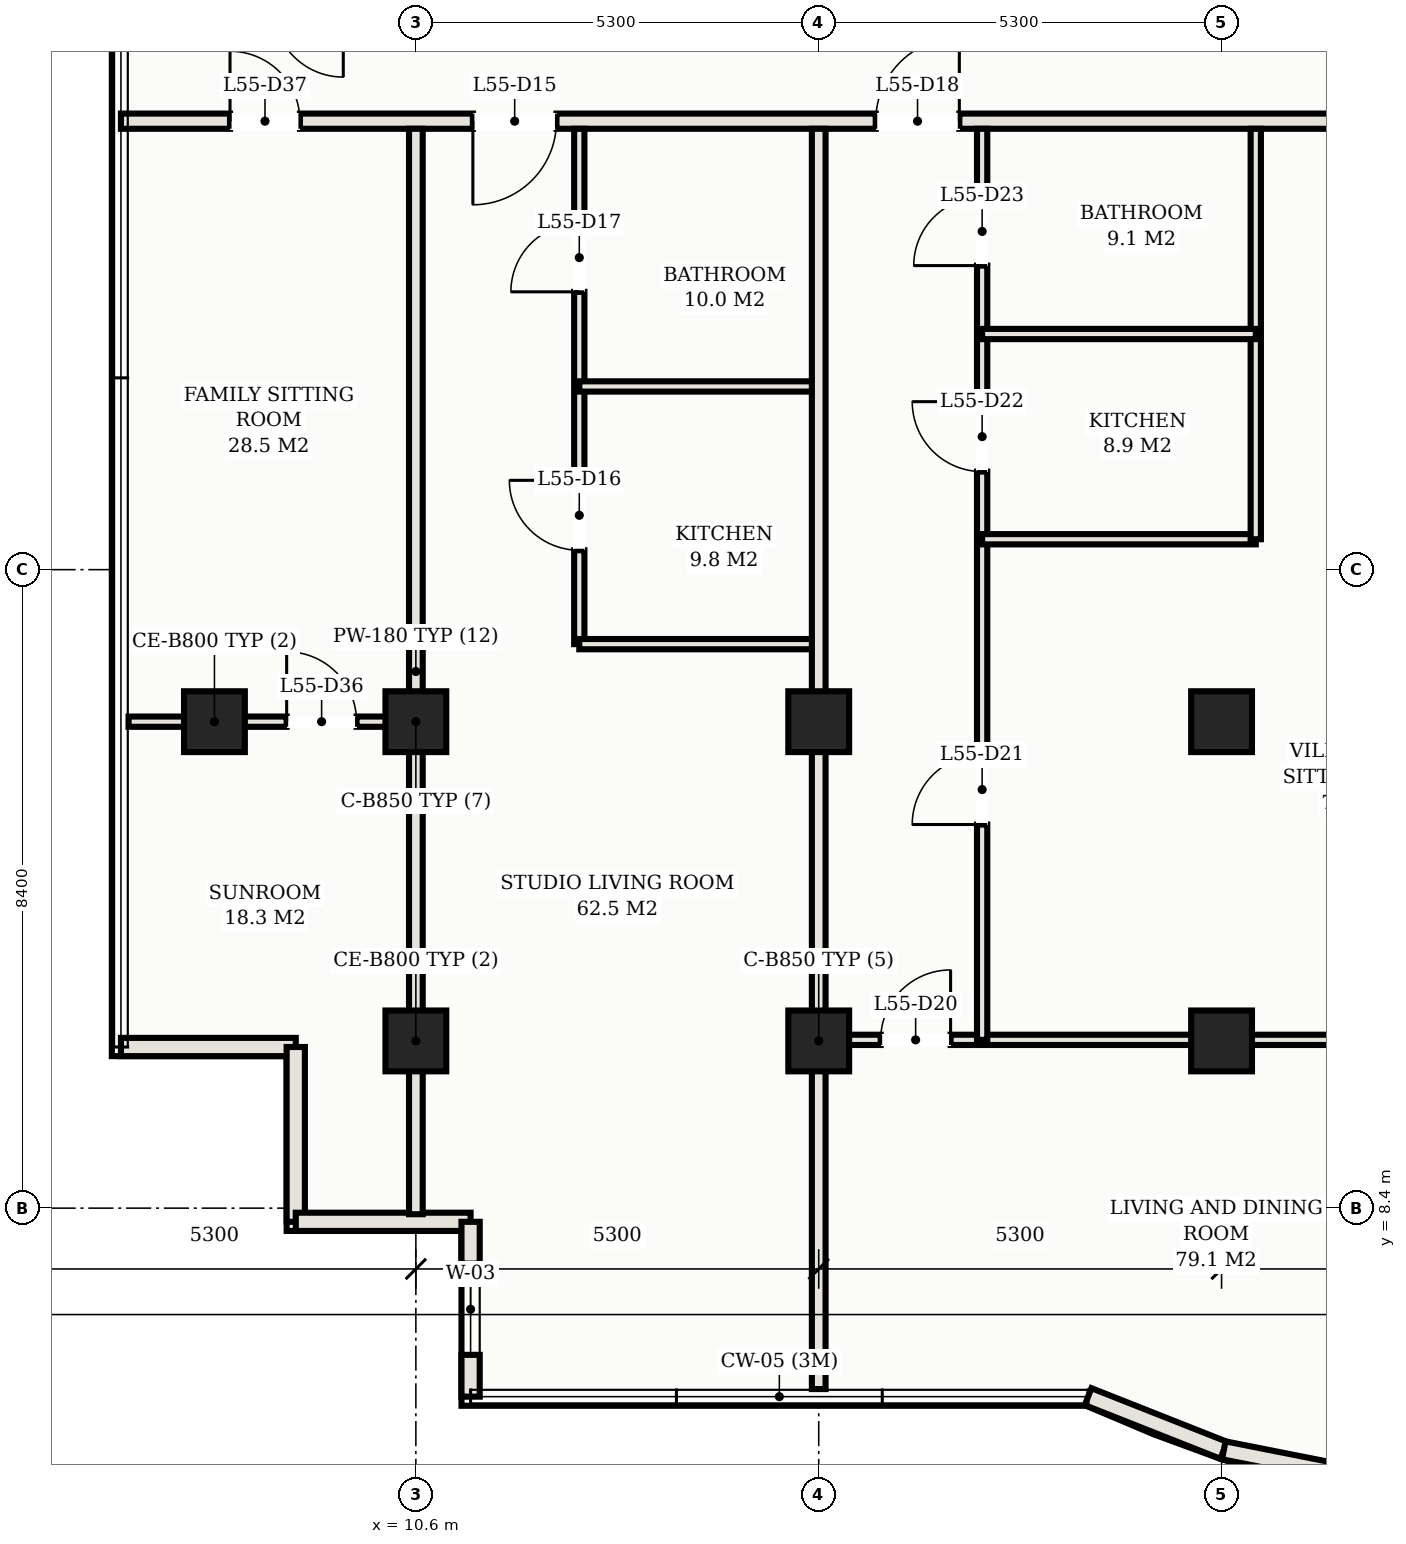
"""IFC4 building model, lengths in metres.
Left out: names, types, materials, properties, quantities, classifications, styles, units other than length and angle.
Written with IfcOpenShell. Run it as: python <this file> out.ifc"""

import sys

from ifc_helpers import new_model, si_unit, direction, frame, frame_2d, origin, origin_2d, place, context, subcontext, project, spatial, rectangle, hollow_rectangle, extrude, element, fill, save


model = new_model("IFC4")
c1 = context("Model", 3, precision=1e-05, world=origin(), true_north=direction((0.0, 1.0)))
c2 = subcontext(c1, "Body", "Model", "MODEL_VIEW")
j1 = project(units=[si_unit("LENGTHUNIT", "METRE"), si_unit("PLANEANGLEUNIT", "RADIAN")], contexts=[c1])
p1 = place(None, origin())
s1 = spatial("IfcSite", under=j1, at=p1, CompositionType="ELEMENT")
p2 = place(p1, origin())
s2 = spatial("IfcBuilding", under=s1, at=p2, CompositionType="ELEMENT")
p3 = place(p2, frame((0.0, 0.0, 203.3)))
s3 = spatial("IfcBuildingStorey", under=s2, at=p3, CompositionType="ELEMENT", Elevation=203.3)
for number, where, z_axis, x_axis in (
    (1, (10.6, 14.8, 0.0), (0.0, 0.0, 1.0), (1.0, 0.0, 0.0)),
    (2, (10.6, 10.6, 0.0), (0.0, 0.0, 1.0), (1.0, 0.0, 0.0)),
    (3, (15.9, 14.8, 0.0), (0.0, 0.0, 1.0), (1.0, 0.0, 0.0)),
    (4, (15.9, 10.6, 0.0), (0.0, 0.0, 1.0), (1.0, 0.0, 0.0)),
    (5, (21.2, 14.8, 0.0), (0.0, 0.0, 1.0), (1.0, 0.0, 0.0)),
    (6, (21.2, 10.6, 0.0), (0.0, 0.0, 1.0), (1.0, 0.0, 0.0)),
    (7, (7.95, 14.8, 0.0), (0.0, 0.0, 1.0), (1.0, 0.0, 0.0)),
):
    element("IfcColumn", number, at=place(p3, frame(where, z_axis=z_axis, x_axis=x_axis)), inside=s3, PredefinedType="COLUMN", context=c2, shape_type="SweptSolid", body=[
        extrude(hollow_rectangle(XDim=0.8, YDim=0.8, WallThickness=0.028, at=origin_2d()), origin(), (0.0, 0.0, 1.0), 3.3),
    ])
for number, where, z_axis, x_axis in (
    (8, (6.72, 10.52, 0.0), (0.0, 0.0, 1.0), (1.0, 0.0, 0.0)),
    (9, (9.02, 10.52, 0.0), (0.0, 0.0, 1.0), (0.0, -1.0, 0.0)),
    (10, (9.02, 8.22, 0.0), (0.0, 0.0, 1.0), (1.0, 0.0, 0.0)),
):
    element("IfcWall", number, at=place(p3, frame(where, z_axis=z_axis, x_axis=x_axis)), inside=s3, PredefinedType="SOLIDWALL", context=c2, shape_type="SweptSolid", body=[
        extrude(rectangle(XDim=2.3, YDim=0.24, at=frame_2d((1.15, 0.0))), origin(), (0.0, 0.0, 1.0), 3.11),
    ])
p4 = place(p3, frame((11.32, 8.22, 0.0), z_axis=(0.0, 0.0, 1.0), x_axis=(0.0, -1.0, 0.0)))
e11 = element("IfcWall", 11, at=p4, inside=s3, PredefinedType="SOLIDWALL", context=c2, shape_type="SweptSolid", body=[
    extrude(rectangle(XDim=2.3, YDim=0.24, at=frame_2d((1.15, 0.0))), origin(), (0.0, 0.0, 1.0), 3.11),
])
p5 = place(p4, frame((0.55, 0.0, 0.75)))
e12 = element("IfcOpeningElement", 12, at=p5, cuts=e11, PredefinedType="OPENING", context=c2, shape_type="SweptSolid", body=[
    extrude(rectangle(XDim=1.2, YDim=1.5, at=frame_2d((0.6, 0.75))), frame((0.0, 0.13, 0.0), z_axis=(0.0, -1.0, 0.0), x_axis=(1.0, 0.0, 0.0)), (0.0, 0.0, 1.0), 0.26),
])
p6 = place(p3, frame((19.444, 5.92, 0.0), z_axis=(0.0, 0.0, 1.0), x_axis=(0.92993442177, -0.367725401906, 0.0)))
e13 = element("IfcWall", 13, at=p6, inside=s3, PredefinedType="SOLIDWALL", context=c2, shape_type="SweptSolid", body=[
    extrude(rectangle(XDim=1.919, YDim=0.24, at=frame_2d((0.96, 0.0))), origin(), (0.0, 0.0, 1.0), 3.11),
])
p7 = place(p3, frame((21.229, 5.214, 0.0), z_axis=(0.0, 0.0, 1.0), x_axis=(0.980985349685, -0.194081796425, 0.0)))
e14 = element("IfcWall", 14, at=p7, inside=s3, PredefinedType="SOLIDWALL", context=c2, shape_type="SweptSolid", body=[
    extrude(rectangle(XDim=4.478, YDim=0.24, at=frame_2d((2.239, 0.0))), origin(), (0.0, 0.0, 1.0), 3.11),
])
p8 = place(p7, frame((1.473, 0.0, 0.0)))
e15 = element("IfcOpeningElement", 15, at=p8, cuts=e14, PredefinedType="OPENING", context=c2, shape_type="SweptSolid", body=[
    extrude(rectangle(XDim=1.8, YDim=2.2, at=frame_2d((0.9, 1.1))), frame((0.0, 0.13, 0.0), z_axis=(0.0, -1.0, 0.0), x_axis=(1.0, 0.0, 0.0)), (0.0, 0.0, 1.0), 0.26),
])
p9 = place(p3, frame((6.72, 22.7, 0.0), z_axis=(0.0, 0.0, 1.0), x_axis=(1.0, 0.0, 0.0)))
e16 = element("IfcWall", 16, at=p9, inside=s3, PredefinedType="PARTITIONING", context=c2, shape_type="SweptSolid", body=[
    extrude(rectangle(XDim=39.56, YDim=0.2, at=frame_2d((19.78, 0.0))), origin(), (0.0, 0.0, 1.0), 2.43),
])
p10 = place(p9, frame((4.63, 0.0, 0.0)))
e17 = element("IfcOpeningElement", 17, at=p10, cuts=e16, PredefinedType="OPENING", context=c2, shape_type="SweptSolid", body=[
    extrude(rectangle(XDim=1.1, YDim=2.25, at=frame_2d((0.55, 1.125))), frame((0.0, 0.11, 0.0), z_axis=(0.0, -1.0, 0.0), x_axis=(1.0, 0.0, 0.0)), (0.0, 0.0, 1.0), 0.22),
])
p11 = place(p9, frame((9.93, 0.0, 0.0)))
e18 = element("IfcOpeningElement", 18, at=p11, cuts=e16, PredefinedType="OPENING", context=c2, shape_type="SweptSolid", body=[
    extrude(rectangle(XDim=1.1, YDim=2.25, at=frame_2d((0.55, 1.125))), frame((0.0, 0.11, 0.0), z_axis=(0.0, -1.0, 0.0), x_axis=(1.0, 0.0, 0.0)), (0.0, 0.0, 1.0), 0.22),
])
p12 = place(p9, frame((25.83, 0.0, 0.0)))
e19 = element("IfcOpeningElement", 19, at=p12, cuts=e16, PredefinedType="OPENING", context=c2, shape_type="SweptSolid", body=[
    extrude(rectangle(XDim=1.1, YDim=2.25, at=frame_2d((0.55, 1.125))), frame((0.0, 0.11, 0.0), z_axis=(0.0, -1.0, 0.0), x_axis=(1.0, 0.0, 0.0)), (0.0, 0.0, 1.0), 0.22),
])
p13 = place(p9, frame((1.435, 0.0, 0.0)))
e20 = element("IfcOpeningElement", 20, at=p13, cuts=e16, PredefinedType="OPENING", context=c2, shape_type="SweptSolid", body=[
    extrude(rectangle(XDim=0.92, YDim=2.15, at=frame_2d((0.46, 1.075))), frame((0.0, 0.11, 0.0), z_axis=(0.0, -1.0, 0.0), x_axis=(1.0, 0.0, 0.0)), (0.0, 0.0, 1.0), 0.22),
])
p14 = place(p9, frame((37.205, 0.0, 0.0)))
e21 = element("IfcOpeningElement", 21, at=p14, cuts=e16, PredefinedType="OPENING", context=c2, shape_type="SweptSolid", body=[
    extrude(rectangle(XDim=0.92, YDim=2.15, at=frame_2d((0.46, 1.075))), frame((0.0, 0.11, 0.0), z_axis=(0.0, -1.0, 0.0), x_axis=(1.0, 0.0, 0.0)), (0.0, 0.0, 1.0), 0.22),
])
p15 = place(p3, frame((10.6, 8.32, 0.0), z_axis=(0.0, 0.0, 1.0), x_axis=(0.0, 1.0, 0.0)))
e22 = element("IfcWall", 22, at=p15, inside=s3, PredefinedType="PARTITIONING", context=c2, shape_type="SweptSolid", body=[
    extrude(rectangle(XDim=14.28, YDim=0.18, at=frame_2d((7.14, 0.0))), origin(), (0.0, 0.0, 1.0), 2.43),
])
p16 = place(p3, frame((12.75, 15.82, 0.0), z_axis=(0.0, 0.0, 1.0), x_axis=(0.0, 1.0, 0.0)))
e23 = element("IfcWall", 23, at=p16, inside=s3, PredefinedType="PARTITIONING", context=c2, shape_type="SweptSolid", body=[
    extrude(rectangle(XDim=6.78, YDim=0.135, at=frame_2d((3.39, 0.0))), origin(), (0.0, 0.0, 1.0), 2.43),
])
p17 = place(p16, frame((1.235, 0.0, 0.0)))
e24 = element("IfcOpeningElement", 24, at=p17, cuts=e23, PredefinedType="OPENING", context=c2, shape_type="SweptSolid", body=[
    extrude(rectangle(XDim=0.92, YDim=2.15, at=frame_2d((0.46, 1.075))), frame((0.0, 0.078, 0.0), z_axis=(0.0, -1.0, 0.0), x_axis=(1.0, 0.0, 0.0)), (0.0, 0.0, 1.0), 0.155),
])
p18 = place(p16, frame((4.635, 0.0, 0.0)))
e25 = element("IfcOpeningElement", 25, at=p18, cuts=e23, PredefinedType="OPENING", context=c2, shape_type="SweptSolid", body=[
    extrude(rectangle(XDim=0.9, YDim=2.15, at=frame_2d((0.45, 1.075))), frame((0.0, 0.078, 0.0), z_axis=(0.0, -1.0, 0.0), x_axis=(1.0, 0.0, 0.0)), (0.0, 0.0, 1.0), 0.155),
])
for number, where, z_axis, x_axis in (
    (26, (12.75, 15.82, 0.0), (0.0, 0.0, 1.0), (1.0, 0.0, 0.0)),
    (27, (12.75, 19.21, 0.0), (0.0, 0.0, 1.0), (1.0, 0.0, 0.0)),
):
    element("IfcWall", number, at=place(p3, frame(where, z_axis=z_axis, x_axis=x_axis)), inside=s3, PredefinedType="PARTITIONING", context=c2, shape_type="SweptSolid", body=[
        extrude(rectangle(XDim=3.15, YDim=0.135, at=frame_2d((1.575, 0.0))), origin(), (0.0, 0.0, 1.0), 2.43),
    ])
p19 = place(p3, frame((15.9, 6.02, 0.0), z_axis=(0.0, 0.0, 1.0), x_axis=(0.0, 1.0, 0.0)))
e28 = element("IfcWall", 28, at=p19, inside=s3, PredefinedType="PARTITIONING", context=c2, shape_type="SweptSolid", body=[
    extrude(rectangle(XDim=16.58, YDim=0.18, at=frame_2d((8.29, 0.0))), origin(), (0.0, 0.0, 1.0), 2.43),
])
p20 = place(p3, frame((15.9, 10.614, 0.0), z_axis=(0.0, 0.0, 1.0), x_axis=(1.0, 0.0, 0.0)))
e29 = element("IfcWall", 29, at=p20, inside=s3, PredefinedType="PARTITIONING", context=c2, shape_type="SweptSolid", body=[
    extrude(rectangle(XDim=10.6, YDim=0.135, at=frame_2d((5.3, 0.0))), origin(), (0.0, 0.0, 1.0), 2.43),
])
p21 = place(p20, frame((0.815, 0.0, 0.0)))
e30 = element("IfcOpeningElement", 30, at=p21, cuts=e29, PredefinedType="OPENING", context=c2, shape_type="SweptSolid", body=[
    extrude(rectangle(XDim=0.92, YDim=2.15, at=frame_2d((0.46, 1.075))), frame((0.0, 0.078, 0.0), z_axis=(0.0, -1.0, 0.0), x_axis=(1.0, 0.0, 0.0)), (0.0, 0.0, 1.0), 0.155),
])
p22 = place(p3, frame((18.05, 10.614, 0.0), z_axis=(0.0, 0.0, 1.0), x_axis=(0.0, 1.0, 0.0)))
e31 = element("IfcWall", 31, at=p22, inside=s3, PredefinedType="PARTITIONING", context=c2, shape_type="SweptSolid", body=[
    extrude(rectangle(XDim=11.986, YDim=0.135, at=frame_2d((5.993, 0.0))), origin(), (0.0, 0.0, 1.0), 2.43),
])
p23 = place(p22, frame((2.833, 0.0, 0.0)))
e32 = element("IfcOpeningElement", 32, at=p23, cuts=e31, PredefinedType="OPENING", context=c2, shape_type="SweptSolid", body=[
    extrude(rectangle(XDim=0.92, YDim=2.15, at=frame_2d((0.46, 1.075))), frame((0.0, 0.078, 0.0), z_axis=(0.0, -1.0, 0.0), x_axis=(1.0, 0.0, 0.0)), (0.0, 0.0, 1.0), 0.155),
])
p24 = place(p22, frame((7.476, 0.0, 0.0)))
e33 = element("IfcOpeningElement", 33, at=p24, cuts=e31, PredefinedType="OPENING", context=c2, shape_type="SweptSolid", body=[
    extrude(rectangle(XDim=0.92, YDim=2.15, at=frame_2d((0.46, 1.075))), frame((0.0, 0.078, 0.0), z_axis=(0.0, -1.0, 0.0), x_axis=(1.0, 0.0, 0.0)), (0.0, 0.0, 1.0), 0.155),
])
p25 = place(p22, frame((10.186, 0.0, 0.0)))
e34 = element("IfcOpeningElement", 34, at=p25, cuts=e31, PredefinedType="OPENING", context=c2, shape_type="SweptSolid", body=[
    extrude(rectangle(XDim=0.9, YDim=2.15, at=frame_2d((0.45, 1.075))), frame((0.0, 0.078, 0.0), z_axis=(0.0, -1.0, 0.0), x_axis=(1.0, 0.0, 0.0)), (0.0, 0.0, 1.0), 0.155),
])
p26 = place(p3, frame((18.05, 17.2, 0.0), z_axis=(0.0, 0.0, 1.0), x_axis=(1.0, 0.0, 0.0)))
e35 = element("IfcWall", 35, at=p26, inside=s3, PredefinedType="PARTITIONING", context=c2, shape_type="SweptSolid", body=[
    extrude(rectangle(XDim=3.6, YDim=0.135, at=frame_2d((1.8, 0.0))), origin(), (0.0, 0.0, 1.0), 2.43),
])
p27 = place(p3, frame((21.65, 17.2, 0.0), z_axis=(0.0, 0.0, 1.0), x_axis=(0.0, 1.0, 0.0)))
e36 = element("IfcWall", 36, at=p27, inside=s3, PredefinedType="PARTITIONING", context=c2, shape_type="SweptSolid", body=[
    extrude(rectangle(XDim=5.4, YDim=0.135, at=frame_2d((2.7, 0.0))), origin(), (0.0, 0.0, 1.0), 2.43),
])
p28 = place(p3, frame((18.05, 19.9, 0.0), z_axis=(0.0, 0.0, 1.0), x_axis=(1.0, 0.0, 0.0)))
e37 = element("IfcWall", 37, at=p28, inside=s3, PredefinedType="PARTITIONING", context=c2, shape_type="SweptSolid", body=[
    extrude(rectangle(XDim=3.6, YDim=0.135, at=frame_2d((1.8, 0.0))), origin(), (0.0, 0.0, 1.0), 2.43),
])
p29 = place(p3, frame((6.82, 14.8, 0.0), z_axis=(0.0, 0.0, 1.0), x_axis=(1.0, 0.0, 0.0)))
e38 = element("IfcWall", 38, at=p29, inside=s3, PredefinedType="PARTITIONING", context=c2, shape_type="SweptSolid", body=[
    extrude(rectangle(XDim=3.78, YDim=0.135, at=frame_2d((1.89, 0.0))), origin(), (0.0, 0.0, 1.0), 2.43),
])
p30 = place(p29, frame((2.08, 0.0, 0.0)))
e39 = element("IfcOpeningElement", 39, at=p30, cuts=e38, PredefinedType="OPENING", context=c2, shape_type="SweptSolid", body=[
    extrude(rectangle(XDim=0.92, YDim=2.15, at=frame_2d((0.46, 1.075))), frame((0.0, 0.078, 0.0), z_axis=(0.0, -1.0, 0.0), x_axis=(1.0, 0.0, 0.0)), (0.0, 0.0, 1.0), 0.155),
])
p31 = place(p5, origin())
e40 = element("IfcWindow", 40, at=p31, inside=s3, PartitioningType="SINGLE_PANEL", PredefinedType="WINDOW", context=c2, shape_type="SweptSolid", body=[
    extrude(rectangle(XDim=1.2, YDim=1.5, at=frame_2d((0.6, 0.75))), frame((0.0, 0.03, 0.0), z_axis=(0.0, -1.0, 0.0), x_axis=(1.0, 0.0, 0.0)), (0.0, 0.0, 1.0), 0.06),
])
fill(e12, e40)
p32 = place(p10, frame((1.1, 0.0, 0.0), z_axis=(0.0, 0.0, 1.0), x_axis=(-1.0, 0.0, 0.0)))
e41 = element("IfcDoor", 41, at=p32, inside=s3, OperationType="SINGLE_SWING_RIGHT", PredefinedType="DOOR", context=c2, shape_type="SweptSolid", body=[
    extrude(rectangle(XDim=1.1, YDim=2.25, at=frame_2d((0.55, 1.125))), frame((0.0, 0.025, 0.0), z_axis=(0.0, -1.0, 0.0), x_axis=(1.0, 0.0, 0.0)), (0.0, 0.0, 1.0), 0.05),
])
fill(e17, e41)
p33 = place(p17, origin())
e42 = element("IfcDoor", 42, at=p33, inside=s3, OperationType="SINGLE_SWING_RIGHT", PredefinedType="DOOR", context=c2, shape_type="SweptSolid", body=[
    extrude(rectangle(XDim=0.92, YDim=2.15, at=frame_2d((0.46, 1.075))), frame((0.0, 0.025, 0.0), z_axis=(0.0, -1.0, 0.0), x_axis=(1.0, 0.0, 0.0)), (0.0, 0.0, 1.0), 0.05),
])
fill(e24, e42)
p34 = place(p18, origin())
e43 = element("IfcDoor", 43, at=p34, inside=s3, OperationType="SINGLE_SWING_LEFT", PredefinedType="DOOR", context=c2, shape_type="SweptSolid", body=[
    extrude(rectangle(XDim=0.9, YDim=2.15, at=frame_2d((0.45, 1.075))), frame((0.0, 0.025, 0.0), z_axis=(0.0, -1.0, 0.0), x_axis=(1.0, 0.0, 0.0)), (0.0, 0.0, 1.0), 0.05),
])
fill(e25, e43)
p35 = place(p11, origin())
e44 = element("IfcDoor", 44, at=p35, inside=s3, OperationType="SINGLE_SWING_RIGHT", PredefinedType="DOOR", context=c2, shape_type="SweptSolid", body=[
    extrude(rectangle(XDim=1.1, YDim=2.25, at=frame_2d((0.55, 1.125))), frame((0.0, 0.025, 0.0), z_axis=(0.0, -1.0, 0.0), x_axis=(1.0, 0.0, 0.0)), (0.0, 0.0, 1.0), 0.05),
])
fill(e18, e44)
p36 = place(p21, origin())
e45 = element("IfcDoor", 45, at=p36, inside=s3, OperationType="SINGLE_SWING_RIGHT", PredefinedType="DOOR", context=c2, shape_type="SweptSolid", body=[
    extrude(rectangle(XDim=0.92, YDim=2.15, at=frame_2d((0.46, 1.075))), frame((0.0, 0.025, 0.0), z_axis=(0.0, -1.0, 0.0), x_axis=(1.0, 0.0, 0.0)), (0.0, 0.0, 1.0), 0.05),
])
fill(e30, e45)
p37 = place(p23, origin())
e46 = element("IfcDoor", 46, at=p37, inside=s3, OperationType="SINGLE_SWING_LEFT", PredefinedType="DOOR", context=c2, shape_type="SweptSolid", body=[
    extrude(rectangle(XDim=0.92, YDim=2.15, at=frame_2d((0.46, 1.075))), frame((0.0, 0.025, 0.0), z_axis=(0.0, -1.0, 0.0), x_axis=(1.0, 0.0, 0.0)), (0.0, 0.0, 1.0), 0.05),
])
fill(e32, e46)
p38 = place(p24, origin())
e47 = element("IfcDoor", 47, at=p38, inside=s3, OperationType="SINGLE_SWING_RIGHT", PredefinedType="DOOR", context=c2, shape_type="SweptSolid", body=[
    extrude(rectangle(XDim=0.92, YDim=2.15, at=frame_2d((0.46, 1.075))), frame((0.0, 0.025, 0.0), z_axis=(0.0, -1.0, 0.0), x_axis=(1.0, 0.0, 0.0)), (0.0, 0.0, 1.0), 0.05),
])
fill(e33, e47)
p39 = place(p25, origin())
e48 = element("IfcDoor", 48, at=p39, inside=s3, OperationType="SINGLE_SWING_LEFT", PredefinedType="DOOR", context=c2, shape_type="SweptSolid", body=[
    extrude(rectangle(XDim=0.9, YDim=2.15, at=frame_2d((0.45, 1.075))), frame((0.0, 0.025, 0.0), z_axis=(0.0, -1.0, 0.0), x_axis=(1.0, 0.0, 0.0)), (0.0, 0.0, 1.0), 0.05),
])
fill(e34, e48)
p40 = place(p30, origin())
e49 = element("IfcDoor", 49, at=p40, inside=s3, OperationType="SINGLE_SWING_LEFT", PredefinedType="DOOR", context=c2, shape_type="SweptSolid", body=[
    extrude(rectangle(XDim=0.92, YDim=2.15, at=frame_2d((0.46, 1.075))), frame((0.0, 0.025, 0.0), z_axis=(0.0, -1.0, 0.0), x_axis=(1.0, 0.0, 0.0)), (0.0, 0.0, 1.0), 0.05),
])
fill(e39, e49)
p41 = place(p13, origin())
e50 = element("IfcDoor", 50, at=p41, inside=s3, OperationType="SINGLE_SWING_LEFT", PredefinedType="DOOR", context=c2, shape_type="SweptSolid", body=[
    extrude(rectangle(XDim=0.92, YDim=2.15, at=frame_2d((0.46, 1.075))), frame((0.0, 0.025, 0.0), z_axis=(0.0, -1.0, 0.0), x_axis=(1.0, 0.0, 0.0)), (0.0, 0.0, 1.0), 0.05),
])
fill(e20, e50)
save(model, sys.argv[1])
